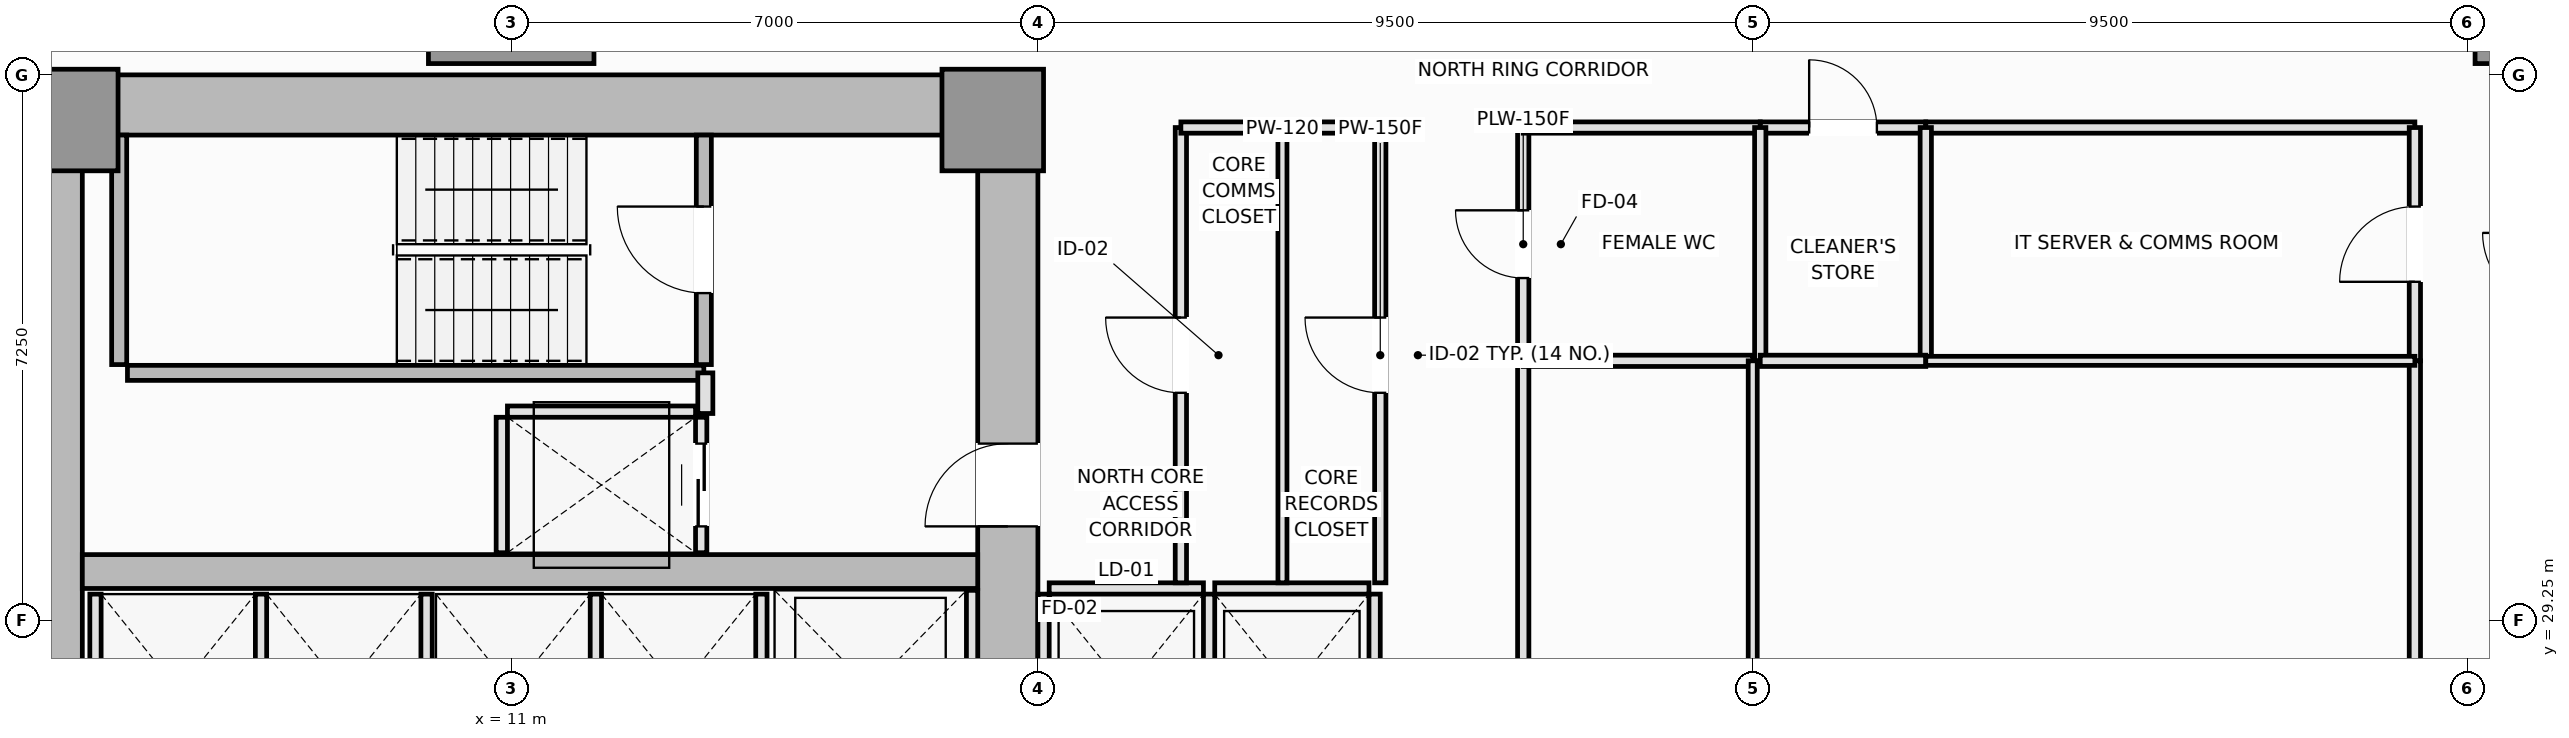
"""IFC4 building model, lengths in metres.
Left out: names, types, materials, properties, quantities, classifications, styles, units other than length and angle.
Written with IfcOpenShell. Run it as: python <this file> out.ifc"""

import sys

from ifc_helpers import new_model, si_unit, direction, frame, frame_2d, origin, origin_2d, place, context, subcontext, project, spatial, rectangle, extrude, element, fill, save


model = new_model("IFC4")
c1 = context("Model", 3, precision=1e-05, world=origin(), true_north=direction((0.0, 1.0)))
c2 = subcontext(c1, "Body", "Model", "MODEL_VIEW")
j1 = project(units=[si_unit("LENGTHUNIT", "METRE"), si_unit("PLANEANGLEUNIT", "RADIAN")], contexts=[c1])
p1 = place(None, origin())
s1 = spatial("IfcSite", under=j1, at=p1, CompositionType="ELEMENT")
p2 = place(p1, origin())
s2 = spatial("IfcBuilding", under=s1, at=p2, CompositionType="ELEMENT")
p3 = place(p2, frame((0.0, 0.0, 32.7)))
s3 = spatial("IfcBuildingStorey", under=s2, at=p3, CompositionType="ELEMENT", Elevation=32.7)
p4 = place(p3, frame((4.5, 36.1, 0.0), z_axis=(0.0, 0.0, 1.0), x_axis=(1.0, 0.0, 0.0)))
e1 = element("IfcWall", 1, at=p4, inside=s3, PredefinedType="SHEAR", context=c2, shape_type="SweptSolid", body=[
    extrude(rectangle(XDim=13.5, YDim=0.8, at=frame_2d((6.75, 0.0))), origin(), (0.0, 0.0, 1.0), 3.55),
])
p5 = place(p3, frame((4.9, 14.8, 0.0), z_axis=(0.0, 0.0, 1.0), x_axis=(0.0, 1.0, 0.0)))
e2 = element("IfcWall", 2, at=p5, inside=s3, PredefinedType="SHEAR", context=c2, shape_type="SweptSolid", body=[
    extrude(rectangle(XDim=20.9, YDim=0.8, at=frame_2d((10.45, 0.0))), origin(), (0.0, 0.0, 1.0), 3.55),
])
p6 = place(p3, frame((17.6, 27.05, 0.0), z_axis=(0.0, 0.0, 1.0), x_axis=(0.0, 1.0, 0.0)))
e3 = element("IfcWall", 3, at=p6, inside=s3, PredefinedType="SHEAR", context=c2, shape_type="SweptSolid", body=[
    extrude(rectangle(XDim=8.65, YDim=0.8, at=frame_2d((4.325, 0.0))), origin(), (0.0, 0.0, 1.0), 3.55),
])
p7 = place(p6, frame((3.45, 0.0, 0.0)))
e4 = element("IfcOpeningElement", 4, at=p7, cuts=e3, PredefinedType="OPENING", context=c2, shape_type="SweptSolid", body=[
    extrude(rectangle(XDim=1.1, YDim=2.15, at=frame_2d((0.55, 1.075))), frame((0.0, 0.41, 0.0), z_axis=(0.0, -1.0, 0.0), x_axis=(1.0, 0.0, 0.0)), (0.0, 0.0, 1.0), 0.82),
])
p8 = place(p3, frame((5.3, 29.9, 0.0), z_axis=(0.0, 0.0, 1.0), x_axis=(1.0, 0.0, 0.0)))
e5 = element("IfcWall", 5, at=p8, inside=s3, PredefinedType="SHEAR", context=c2, shape_type="SweptSolid", body=[
    extrude(rectangle(XDim=11.9, YDim=0.45, at=frame_2d((5.95, 0.0))), origin(), (0.0, 0.0, 1.0), 3.55),
])
for number, where, z_axis, x_axis in (
    (6, (5.1, 35.9, 0.0), (0.0, 0.0, 1.0), (1.0, 0.0, 0.0)),
    (7, (17.4, 35.9, 0.0), (0.0, 0.0, 1.0), (1.0, 0.0, 0.0)),
):
    element("IfcColumn", number, at=place(p3, frame(where, z_axis=z_axis, x_axis=x_axis)), inside=s3, PredefinedType="PILASTER", context=c2, shape_type="SweptSolid", body=[
        extrude(rectangle(XDim=1.35, YDim=1.35, at=origin_2d()), origin(), (0.0, 0.0, 1.0), 3.55),
    ])
for number, where, z_axis, x_axis in (
    (8, (11.0, 37.75, 0.0), (0.0, 0.0, 1.0), (1.0, 0.0, 0.0)),
    (9, (38.2, 37.75, 0.0), (0.0, 0.0, 1.0), (1.0, 0.0, 0.0)),
):
    element("IfcColumn", number, at=place(p3, frame(where, z_axis=z_axis, x_axis=x_axis)), inside=s3, PredefinedType="COLUMN", context=c2, shape_type="SweptSolid", body=[
        extrude(rectangle(XDim=2.2, YDim=2.2, at=origin_2d()), origin(), (0.0, 0.0, 1.0), 3.55),
    ])
p9 = place(p3, frame((5.79, 32.65, 0.0), z_axis=(0.0, 0.0, 1.0), x_axis=(0.0, 1.0, 0.0)))
e10 = element("IfcWall", 10, at=p9, inside=s3, PredefinedType="SOLIDWALL", context=c2, shape_type="SweptSolid", body=[
    extrude(rectangle(XDim=3.05, YDim=0.2, at=frame_2d((1.525, 0.0))), origin(), (0.0, 0.0, 1.0), 3.55),
])
p10 = place(p3, frame((5.9, 32.54, 0.0), z_axis=(0.0, 0.0, 1.0), x_axis=(1.0, 0.0, 0.0)))
e11 = element("IfcWall", 11, at=p10, inside=s3, PredefinedType="SOLIDWALL", context=c2, shape_type="SweptSolid", body=[
    extrude(rectangle(XDim=7.66, YDim=0.2, at=frame_2d((3.83, 0.0))), origin(), (0.0, 0.0, 1.0), 3.55),
])
p11 = place(p3, frame((13.56, 32.65, 0.0), z_axis=(0.0, 0.0, 1.0), x_axis=(0.0, 1.0, 0.0)))
e12 = element("IfcWall", 12, at=p11, inside=s3, PredefinedType="SOLIDWALL", context=c2, shape_type="SweptSolid", body=[
    extrude(rectangle(XDim=3.05, YDim=0.2, at=frame_2d((1.525, 0.0))), origin(), (0.0, 0.0, 1.0), 3.55),
])
p12 = place(p11, frame((0.95, 0.0, 0.0)))
e13 = element("IfcOpeningElement", 13, at=p12, cuts=e12, PredefinedType="OPENING", context=c2, shape_type="SweptSolid", body=[
    extrude(rectangle(XDim=1.15, YDim=2.15, at=frame_2d((0.575, 1.075))), frame((0.0, 0.11, 0.0), z_axis=(0.0, -1.0, 0.0), x_axis=(1.0, 0.0, 0.0)), (0.0, 0.0, 1.0), 0.22),
])
p13 = place(p3, frame((18.15, 29.675, 0.0), z_axis=(0.0, 0.0, 1.0), x_axis=(1.0, 0.0, 0.0)))
e14 = element("IfcWall", 14, at=p13, inside=s3, PredefinedType="PARTITIONING", context=c2, shape_type="SweptSolid", body=[
    extrude(rectangle(XDim=2.05, YDim=0.15, at=frame_2d((1.025, 0.0))), origin(), (0.0, 0.0, 1.0), 3.37),
])
for number, where, z_axis, x_axis in (
    (15, (18.075, 27.05, 0.0), (0.0, 0.0, 1.0), (0.0, 1.0, 0.0)),
    (16, (20.275, 27.05, 0.0), (0.0, 0.0, 1.0), (0.0, 1.0, 0.0)),
):
    element("IfcWall", number, at=place(p3, frame(where, z_axis=z_axis, x_axis=x_axis)), inside=s3, PredefinedType="PARTITIONING", context=c2, shape_type="SweptSolid", body=[
        extrude(rectangle(XDim=2.55, YDim=0.15, at=frame_2d((1.275, 0.0))), origin(), (0.0, 0.0, 1.0), 3.37),
    ])
p14 = place(p3, frame((20.35, 29.675, 0.0), z_axis=(0.0, 0.0, 1.0), x_axis=(1.0, 0.0, 0.0)))
e17 = element("IfcWall", 17, at=p14, inside=s3, PredefinedType="PARTITIONING", context=c2, shape_type="SweptSolid", body=[
    extrude(rectangle(XDim=2.05, YDim=0.15, at=frame_2d((1.025, 0.0))), origin(), (0.0, 0.0, 1.0), 3.37),
])
for number, where, z_axis, x_axis in (
    (18, (22.475, 27.05, 0.0), (0.0, 0.0, 1.0), (0.0, 1.0, 0.0)),
    (19, (5.475, 27.05, 0.0), (0.0, 0.0, 1.0), (0.0, 1.0, 0.0)),
    (20, (7.675, 27.05, 0.0), (0.0, 0.0, 1.0), (0.0, 1.0, 0.0)),
    (21, (9.875, 27.05, 0.0), (0.0, 0.0, 1.0), (0.0, 1.0, 0.0)),
    (22, (12.125, 27.05, 0.0), (0.0, 0.0, 1.0), (0.0, 1.0, 0.0)),
    (23, (14.325, 27.05, 0.0), (0.0, 0.0, 1.0), (0.0, 1.0, 0.0)),
):
    element("IfcWall", number, at=place(p3, frame(where, z_axis=z_axis, x_axis=x_axis)), inside=s3, PredefinedType="PARTITIONING", context=c2, shape_type="SweptSolid", body=[
        extrude(rectangle(XDim=2.55, YDim=0.15, at=frame_2d((1.275, 0.0))), origin(), (0.0, 0.0, 1.0), 3.37),
    ])
p15 = place(p3, frame((17.125, 27.05, 0.0), z_axis=(0.0, 0.0, 1.0), x_axis=(0.0, 1.0, 0.0)))
e24 = element("IfcWall", 24, at=p15, inside=s3, PredefinedType="PARTITIONING", context=c2, shape_type="SweptSolid", body=[
    extrude(rectangle(XDim=2.6, YDim=0.15, at=frame_2d((1.3, 0.0))), origin(), (0.0, 0.0, 1.0), 3.37),
])
p16 = place(p3, frame((10.95, 32.025, 0.0), z_axis=(0.0, 0.0, 1.0), x_axis=(1.0, 0.0, 0.0)))
e25 = element("IfcWall", 25, at=p16, inside=s3, PredefinedType="PARTITIONING", context=c2, shape_type="SweptSolid", body=[
    extrude(rectangle(XDim=2.5, YDim=0.15, at=frame_2d((1.25, 0.0))), origin(), (0.0, 0.0, 1.0), 3.37),
])
p17 = place(p3, frame((10.875, 30.15, 0.0), z_axis=(0.0, 0.0, 1.0), x_axis=(0.0, 1.0, 0.0)))
e26 = element("IfcWall", 26, at=p17, inside=s3, PredefinedType="PARTITIONING", context=c2, shape_type="SweptSolid", body=[
    extrude(rectangle(XDim=1.8, YDim=0.15, at=frame_2d((0.9, 0.0))), origin(), (0.0, 0.0, 1.0), 3.37),
])
p18 = place(p3, frame((13.525, 30.15, 0.0), z_axis=(0.0, 0.0, 1.0), x_axis=(0.0, 1.0, 0.0)))
e27 = element("IfcWall", 27, at=p18, inside=s3, PredefinedType="PARTITIONING", context=c2, shape_type="SweptSolid", body=[
    extrude(rectangle(XDim=1.8, YDim=0.15, at=frame_2d((0.9, 0.0))), origin(), (0.0, 0.0, 1.0), 3.37),
])
p19 = place(p18, frame((0.35, 0.0, 0.0)))
e28 = element("IfcOpeningElement", 28, at=p19, cuts=e27, PredefinedType="OPENING", context=c2, shape_type="SweptSolid", body=[
    extrude(rectangle(XDim=1.1, YDim=2.2, at=frame_2d((0.55, 1.1))), frame((0.0, 0.085, 0.0), z_axis=(0.0, -1.0, 0.0), x_axis=(1.0, 0.0, 0.0)), (0.0, 0.0, 1.0), 0.17),
])
p20 = place(p3, frame((13.58, 32.0, 0.0), z_axis=(0.0, 0.0, 1.0), x_axis=(0.0, 1.0, 0.0)))
e29 = element("IfcWall", 29, at=p20, inside=s3, PredefinedType="PARTITIONING", context=c2, shape_type="SweptSolid", body=[
    extrude(rectangle(XDim=0.54, YDim=0.2, at=frame_2d((0.27, 0.0))), origin(), (0.0, 0.0, 1.0), 3.37),
])
p21 = place(p3, frame((22.55, 29.75, 0.0), z_axis=(0.0, 0.0, 1.0), x_axis=(0.0, 1.0, 0.0)))
e30 = element("IfcWall", 30, at=p21, inside=s3, PredefinedType="PARTITIONING", context=c2, shape_type="SweptSolid", body=[
    extrude(rectangle(XDim=6.05, YDim=0.15, at=frame_2d((3.025, 0.0))), origin(), (0.0, 0.0, 1.0), 3.01),
])
p22 = place(p21, frame((2.525, 0.0, 0.0)))
e31 = element("IfcOpeningElement", 31, at=p22, cuts=e30, PredefinedType="OPENING", context=c2, shape_type="SweptSolid", body=[
    extrude(rectangle(XDim=1.0, YDim=2.15, at=frame_2d((0.5, 1.075))), frame((0.0, 0.085, 0.0), z_axis=(0.0, -1.0, 0.0), x_axis=(1.0, 0.0, 0.0)), (0.0, 0.0, 1.0), 0.17),
])
p23 = place(p3, frame((24.45, 32.7, 0.0), z_axis=(0.0, 0.0, 1.0), x_axis=(0.0, 1.0, 0.0)))
e32 = element("IfcWall", 32, at=p23, inside=s3, PredefinedType="PLUMBINGWALL", context=c2, shape_type="SweptSolid", body=[
    extrude(rectangle(XDim=3.1, YDim=0.15, at=frame_2d((1.55, 0.0))), origin(), (0.0, 0.0, 1.0), 3.37),
])
p24 = place(p23, frame((1.1, 0.0, 0.0)))
e33 = element("IfcOpeningElement", 33, at=p24, cuts=e32, PredefinedType="OPENING", context=c2, shape_type="SweptSolid", body=[
    extrude(rectangle(XDim=0.9, YDim=2.1, at=frame_2d((0.45, 1.05))), frame((0.0, 0.085, 0.0), z_axis=(0.0, -1.0, 0.0), x_axis=(1.0, 0.0, 0.0)), (0.0, 0.0, 1.0), 0.17),
])
p25 = place(p3, frame((24.45, 17.8, 0.0), z_axis=(0.0, 0.0, 1.0), x_axis=(0.0, 1.0, 0.0)))
e34 = element("IfcWall", 34, at=p25, inside=s3, PredefinedType="PARTITIONING", context=c2, shape_type="SweptSolid", body=[
    extrude(rectangle(XDim=14.9, YDim=0.15, at=frame_2d((7.45, 0.0))), origin(), (0.0, 0.0, 1.0), 3.37),
])
p26 = place(p25, frame((6.95, 0.0, 0.0)))
e35 = element("IfcOpeningElement", 35, at=p26, cuts=e34, PredefinedType="OPENING", context=c2, shape_type="SweptSolid", body=[
    extrude(rectangle(XDim=1.0, YDim=2.15, at=frame_2d((0.5, 1.075))), frame((0.0, 0.085, 0.0), z_axis=(0.0, -1.0, 0.0), x_axis=(1.0, 0.0, 0.0)), (0.0, 0.0, 1.0), 0.17),
])
p27 = place(p3, frame((19.9, 29.75, 0.0), z_axis=(0.0, 0.0, 1.0), x_axis=(0.0, 1.0, 0.0)))
e36 = element("IfcWall", 36, at=p27, inside=s3, PredefinedType="PARTITIONING", context=c2, shape_type="SweptSolid", body=[
    extrude(rectangle(XDim=6.05, YDim=0.15, at=frame_2d((3.025, 0.0))), origin(), (0.0, 0.0, 1.0), 3.37),
])
p28 = place(p27, frame((2.525, 0.0, 0.0)))
e37 = element("IfcOpeningElement", 37, at=p28, cuts=e36, PredefinedType="OPENING", context=c2, shape_type="SweptSolid", body=[
    extrude(rectangle(XDim=1.0, YDim=2.15, at=frame_2d((0.5, 1.075))), frame((0.0, 0.085, 0.0), z_axis=(0.0, -1.0, 0.0), x_axis=(1.0, 0.0, 0.0)), (0.0, 0.0, 1.0), 0.17),
])
p29 = place(p3, frame((19.9, 35.8, 0.0), z_axis=(0.0, 0.0, 1.0), x_axis=(1.0, 0.0, 0.0)))
e38 = element("IfcWall", 38, at=p29, inside=s3, PredefinedType="PARTITIONING", context=c2, shape_type="SweptSolid", body=[
    extrude(rectangle(XDim=1.35, YDim=0.15, at=frame_2d((0.675, 0.0))), origin(), (0.0, 0.0, 1.0), 3.37),
])
p30 = place(p3, frame((21.25, 35.8, 0.0), z_axis=(0.0, 0.0, 1.0), x_axis=(1.0, 0.0, 0.0)))
e39 = element("IfcWall", 39, at=p30, inside=s3, PredefinedType="PARTITIONING", context=c2, shape_type="SweptSolid", body=[
    extrude(rectangle(XDim=1.3, YDim=0.15, at=frame_2d((0.65, 0.0))), origin(), (0.0, 0.0, 1.0), 3.37),
])
p31 = place(p3, frame((24.45, 35.8, 0.0), z_axis=(0.0, 0.0, 1.0), x_axis=(1.0, 0.0, 0.0)))
e40 = element("IfcWall", 40, at=p31, inside=s3, PredefinedType="PLUMBINGWALL", context=c2, shape_type="SweptSolid", body=[
    extrude(rectangle(XDim=3.15, YDim=0.15, at=frame_2d((1.575, 0.0))), origin(), (0.0, 0.0, 1.0), 3.37),
])
p32 = place(p3, frame((27.6, 35.8, 0.0), z_axis=(0.0, 0.0, 1.0), x_axis=(1.0, 0.0, 0.0)))
e41 = element("IfcWall", 41, at=p32, inside=s3, PredefinedType="PLUMBINGWALL", context=c2, shape_type="SweptSolid", body=[
    extrude(rectangle(XDim=2.2, YDim=0.15, at=frame_2d((1.1, 0.0))), origin(), (0.0, 0.0, 1.0), 3.37),
])
p33 = place(p32, frame((0.65, 0.0, 0.0)))
e42 = element("IfcOpeningElement", 42, at=p33, cuts=e41, PredefinedType="OPENING", context=c2, shape_type="SweptSolid", body=[
    extrude(rectangle(XDim=0.9, YDim=2.1, at=frame_2d((0.45, 1.05))), frame((0.0, 0.085, 0.0), z_axis=(0.0, -1.0, 0.0), x_axis=(1.0, 0.0, 0.0)), (0.0, 0.0, 1.0), 0.17),
])
p34 = place(p3, frame((29.8, 35.8, 0.0), z_axis=(0.0, 0.0, 1.0), x_axis=(1.0, 0.0, 0.0)))
e43 = element("IfcWall", 43, at=p34, inside=s3, PredefinedType="PARTITIONING", context=c2, shape_type="SweptSolid", body=[
    extrude(rectangle(XDim=6.5, YDim=0.15, at=frame_2d((3.25, 0.0))), origin(), (0.0, 0.0, 1.0), 3.37),
])
p35 = place(p3, frame((36.3, 32.7, 0.0), z_axis=(0.0, 0.0, 1.0), x_axis=(0.0, 1.0, 0.0)))
e44 = element("IfcWall", 44, at=p35, inside=s3, PredefinedType="PARTITIONING", context=c2, shape_type="SweptSolid", body=[
    extrude(rectangle(XDim=3.1, YDim=0.15, at=frame_2d((1.55, 0.0))), origin(), (0.0, 0.0, 1.0), 3.37),
])
p36 = place(p35, frame((1.05, 0.0, 0.0)))
e45 = element("IfcOpeningElement", 45, at=p36, cuts=e44, PredefinedType="OPENING", context=c2, shape_type="SweptSolid", body=[
    extrude(rectangle(XDim=1.0, YDim=2.15, at=frame_2d((0.5, 1.075))), frame((0.0, 0.085, 0.0), z_axis=(0.0, -1.0, 0.0), x_axis=(1.0, 0.0, 0.0)), (0.0, 0.0, 1.0), 0.17),
])
p37 = place(p3, frame((36.3, 17.8, 0.0), z_axis=(0.0, 0.0, 1.0), x_axis=(0.0, 1.0, 0.0)))
e46 = element("IfcWall", 46, at=p37, inside=s3, PredefinedType="PARTITIONING", context=c2, shape_type="SweptSolid", body=[
    extrude(rectangle(XDim=14.9, YDim=0.15, at=frame_2d((7.45, 0.0))), origin(), (0.0, 0.0, 1.0), 3.37),
])
p38 = place(p37, frame((8.364, 0.0, 0.0)))
e47 = element("IfcOpeningElement", 47, at=p38, cuts=e46, PredefinedType="OPENING", context=c2, shape_type="SweptSolid", body=[
    extrude(rectangle(XDim=1.0, YDim=2.15, at=frame_2d((0.5, 1.075))), frame((0.0, 0.085, 0.0), z_axis=(0.0, -1.0, 0.0), x_axis=(1.0, 0.0, 0.0)), (0.0, 0.0, 1.0), 0.17),
])
p39 = place(p3, frame((21.25, 29.75, 0.0), z_axis=(0.0, 0.0, 1.0), x_axis=(0.0, 1.0, 0.0)))
e48 = element("IfcWall", 48, at=p39, inside=s3, PredefinedType="PARTITIONING", context=c2, shape_type="SweptSolid", body=[
    extrude(rectangle(XDim=6.05, YDim=0.12, at=frame_2d((3.025, 0.0))), origin(), (0.0, 0.0, 1.0), 3.37),
])
p40 = place(p3, frame((27.6, 32.7, 0.0), z_axis=(0.0, 0.0, 1.0), x_axis=(0.0, 1.0, 0.0)))
e49 = element("IfcWall", 49, at=p40, inside=s3, PredefinedType="PLUMBINGWALL", context=c2, shape_type="SweptSolid", body=[
    extrude(rectangle(XDim=3.1, YDim=0.15, at=frame_2d((1.55, 0.0))), origin(), (0.0, 0.0, 1.0), 3.37),
])
p41 = place(p3, frame((24.45, 32.7, 0.0), z_axis=(0.0, 0.0, 1.0), x_axis=(1.0, 0.0, 0.0)))
e50 = element("IfcWall", 50, at=p41, inside=s3, PredefinedType="PLUMBINGWALL", context=c2, shape_type="SweptSolid", body=[
    extrude(rectangle(XDim=3.05, YDim=0.15, at=frame_2d((1.525, 0.0))), origin(), (0.0, 0.0, 1.0), 3.37),
])
p42 = place(p3, frame((29.8, 32.7, 0.0), z_axis=(0.0, 0.0, 1.0), x_axis=(0.0, 1.0, 0.0)))
e51 = element("IfcWall", 51, at=p42, inside=s3, PredefinedType="PLUMBINGWALL", context=c2, shape_type="SweptSolid", body=[
    extrude(rectangle(XDim=3.1, YDim=0.15, at=frame_2d((1.55, 0.0))), origin(), (0.0, 0.0, 1.0), 3.37),
])
p43 = place(p3, frame((27.6, 32.7, 0.0), z_axis=(0.0, 0.0, 1.0), x_axis=(1.0, 0.0, 0.0)))
e52 = element("IfcWall", 52, at=p43, inside=s3, PredefinedType="PLUMBINGWALL", context=c2, shape_type="SweptSolid", body=[
    extrude(rectangle(XDim=2.2, YDim=0.15, at=frame_2d((1.1, 0.0))), origin(), (0.0, 0.0, 1.0), 3.37),
])
p44 = place(p3, frame((29.8, 32.7, 0.0), z_axis=(0.0, 0.0, 1.0), x_axis=(1.0, 0.0, 0.0)))
e53 = element("IfcWall", 53, at=p44, inside=s3, PredefinedType="PARTITIONING", context=c2, shape_type="SweptSolid", body=[
    extrude(rectangle(XDim=6.5, YDim=0.12, at=frame_2d((3.25, 0.0))), origin(), (0.0, 0.0, 1.0), 3.37),
])
p45 = place(p3, frame((27.5, 17.8, 0.0), z_axis=(0.0, 0.0, 1.0), x_axis=(0.0, 1.0, 0.0)))
e54 = element("IfcWall", 54, at=p45, inside=s3, PredefinedType="PARTITIONING", context=c2, shape_type="SweptSolid", body=[
    extrude(rectangle(XDim=14.9, YDim=0.12, at=frame_2d((7.45, 0.0))), origin(), (0.0, 0.0, 1.0), 3.37),
])
p46 = place(p12, origin())
e55 = element("IfcDoor", 55, at=p46, inside=s3, OperationType="SINGLE_SWING_RIGHT", PredefinedType="DOOR", context=c2, shape_type="SweptSolid", body=[
    extrude(rectangle(XDim=1.15, YDim=2.15, at=frame_2d((0.575, 1.075))), frame((0.0, 0.025, 0.0), z_axis=(0.0, -1.0, 0.0), x_axis=(1.0, 0.0, 0.0)), (0.0, 0.0, 1.0), 0.05),
])
fill(e13, e55)
p47 = place(p19, origin())
e56 = element("IfcDoor", 56, at=p47, inside=s3, OperationType="DOUBLE_DOOR_SLIDING", PredefinedType="DOOR", context=c2, shape_type="SweptSolid", body=[
    extrude(rectangle(XDim=1.1, YDim=2.2, at=frame_2d((0.55, 1.1))), frame((0.0, 0.025, 0.0), z_axis=(0.0, -1.0, 0.0), x_axis=(1.0, 0.0, 0.0)), (0.0, 0.0, 1.0), 0.05),
])
fill(e28, e56)
p48 = place(p7, origin())
e57 = element("IfcDoor", 57, at=p48, inside=s3, OperationType="SINGLE_SWING_LEFT", PredefinedType="DOOR", context=c2, shape_type="SweptSolid", body=[
    extrude(rectangle(XDim=1.1, YDim=2.15, at=frame_2d((0.55, 1.075))), frame((0.0, 0.025, 0.0), z_axis=(0.0, -1.0, 0.0), x_axis=(1.0, 0.0, 0.0)), (0.0, 0.0, 1.0), 0.05),
])
fill(e4, e57)
p49 = place(p22, origin())
e58 = element("IfcDoor", 58, at=p49, inside=s3, OperationType="SINGLE_SWING_RIGHT", PredefinedType="DOOR", context=c2, shape_type="SweptSolid", body=[
    extrude(rectangle(XDim=1.0, YDim=2.15, at=frame_2d((0.5, 1.075))), frame((0.0, 0.025, 0.0), z_axis=(0.0, -1.0, 0.0), x_axis=(1.0, 0.0, 0.0)), (0.0, 0.0, 1.0), 0.05),
])
fill(e31, e58)
p50 = place(p24, origin())
e59 = element("IfcDoor", 59, at=p50, inside=s3, OperationType="SINGLE_SWING_RIGHT", PredefinedType="DOOR", context=c2, shape_type="SweptSolid", body=[
    extrude(rectangle(XDim=0.9, YDim=2.1, at=frame_2d((0.45, 1.05))), frame((0.0, 0.025, 0.0), z_axis=(0.0, -1.0, 0.0), x_axis=(1.0, 0.0, 0.0)), (0.0, 0.0, 1.0), 0.05),
])
fill(e33, e59)
p51 = place(p28, origin())
e60 = element("IfcDoor", 60, at=p51, inside=s3, OperationType="SINGLE_SWING_RIGHT", PredefinedType="DOOR", context=c2, shape_type="SweptSolid", body=[
    extrude(rectangle(XDim=1.0, YDim=2.15, at=frame_2d((0.5, 1.075))), frame((0.0, 0.025, 0.0), z_axis=(0.0, -1.0, 0.0), x_axis=(1.0, 0.0, 0.0)), (0.0, 0.0, 1.0), 0.05),
])
fill(e37, e60)
p52 = place(p33, origin())
e61 = element("IfcDoor", 61, at=p52, inside=s3, OperationType="SINGLE_SWING_LEFT", PredefinedType="DOOR", context=c2, shape_type="SweptSolid", body=[
    extrude(rectangle(XDim=0.9, YDim=2.1, at=frame_2d((0.45, 1.05))), frame((0.0, 0.025, 0.0), z_axis=(0.0, -1.0, 0.0), x_axis=(1.0, 0.0, 0.0)), (0.0, 0.0, 1.0), 0.05),
])
fill(e42, e61)
p53 = place(p36, origin())
e62 = element("IfcDoor", 62, at=p53, inside=s3, OperationType="SINGLE_SWING_LEFT", PredefinedType="DOOR", context=c2, shape_type="SweptSolid", body=[
    extrude(rectangle(XDim=1.0, YDim=2.15, at=frame_2d((0.5, 1.075))), frame((0.0, 0.025, 0.0), z_axis=(0.0, -1.0, 0.0), x_axis=(1.0, 0.0, 0.0)), (0.0, 0.0, 1.0), 0.05),
])
fill(e45, e62)
save(model, sys.argv[1])
